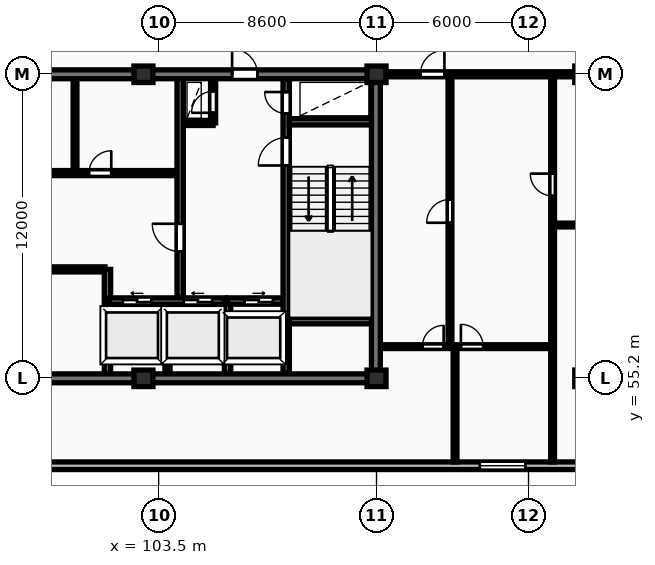
"""IFC4 building model, lengths in metres.
Left out: names, types, materials, properties, quantities, classifications, styles, units other than length and angle.
Written with IfcOpenShell. Run it as: python <this file> out.ifc"""

import sys

from ifc_helpers import new_model, si_unit, direction, frame, frame_2d, origin, origin_2d, place, context, subcontext, project, spatial, rectangle, extrude, element, fill, save


model = new_model("IFC4")
c1 = context("Model", 3, precision=1e-05, world=origin(), true_north=direction((0.0, 1.0)))
c2 = subcontext(c1, "Body", "Model", "MODEL_VIEW")
j1 = project(units=[si_unit("LENGTHUNIT", "METRE"), si_unit("PLANEANGLEUNIT", "RADIAN")], contexts=[c1])
p1 = place(None, origin())
s1 = spatial("IfcSite", under=j1, at=p1, CompositionType="ELEMENT")
p2 = place(p1, origin())
s2 = spatial("IfcBuilding", under=s1, at=p2, CompositionType="ELEMENT")
p3 = place(p2, frame((0.0, 0.0, 235.55)))
s3 = spatial("IfcBuildingStorey", under=s2, at=p3, CompositionType="ELEMENT", Elevation=235.55)
for number, where, z_axis, x_axis in (
    (1, (102.9, 55.2, 0.0), (0.0, 0.0, 1.0), (1.0, 0.0, 0.0)),
    (2, (102.9, 67.2, 0.0), (0.0, 0.0, 1.0), (1.0, 0.0, 0.0)),
    (3, (112.1, 55.2, 0.0), (0.0, 0.0, 1.0), (1.0, 0.0, 0.0)),
    (4, (112.1, 67.2, 0.0), (0.0, 0.0, 1.0), (1.0, 0.0, 0.0)),
    (5, (120.3, 55.2, 0.0), (0.0, 0.0, 1.0), (1.0, 0.0, 0.0)),
    (6, (120.3, 67.2, 0.0), (0.0, 0.0, 1.0), (1.0, 0.0, 0.0)),
):
    element("IfcColumn", number, at=place(p3, frame(where, z_axis=z_axis, x_axis=x_axis)), inside=s3, PredefinedType="COLUMN", context=c2, shape_type="SweptSolid", body=[
        extrude(rectangle(XDim=0.75, YDim=0.65, at=origin_2d()), origin(), (0.0, 0.0, 1.0), 3.45),
    ])
p4 = place(p3, frame((59.8, 51.75, 0.0), z_axis=(0.0, 0.0, 1.0), x_axis=(1.0, 0.0, 0.0)))
e7 = element("IfcWall", 7, at=p4, inside=s3, PredefinedType="STANDARD", context=c2, shape_type="SweptSolid", body=[
    extrude(rectangle(XDim=68.6, YDim=0.3, at=frame_2d((34.3, 0.0))), origin(), (0.0, 0.0, 1.0), 3.17),
])
p5 = place(p4, frame((13.025, 0.0, 0.85)))
e8 = element("IfcOpeningElement", 8, at=p5, cuts=e7, PredefinedType="OPENING", context=c2, shape_type="SweptSolid", body=[
    extrude(rectangle(XDim=1.8, YDim=1.8, at=frame_2d((0.9, 0.9))), frame((0.0, 0.16, 0.0), z_axis=(0.0, -1.0, 0.0), x_axis=(1.0, 0.0, 0.0)), (0.0, 0.0, 1.0), 0.32),
])
p6 = place(p4, frame((56.375, 0.0, 0.85)))
e9 = element("IfcOpeningElement", 9, at=p6, cuts=e7, PredefinedType="OPENING", context=c2, shape_type="SweptSolid", body=[
    extrude(rectangle(XDim=1.8, YDim=1.8, at=frame_2d((0.9, 0.9))), frame((0.0, 0.16, 0.0), z_axis=(0.0, -1.0, 0.0), x_axis=(1.0, 0.0, 0.0)), (0.0, 0.0, 1.0), 0.32),
])
p7 = place(p3, frame((75.95, 55.2, 0.0), z_axis=(0.0, 0.0, 1.0), x_axis=(1.0, 0.0, 0.0)))
e10 = element("IfcWall", 10, at=p7, inside=s3, PredefinedType="SHEAR", context=c2, shape_type="SweptSolid", body=[
    extrude(rectangle(XDim=36.3, YDim=0.35, at=frame_2d((18.15, 0.0))), origin(), (0.0, 0.0, 1.0), 3.45),
])
p8 = place(p3, frame((112.075, 55.375, 0.0), z_axis=(0.0, 0.0, 1.0), x_axis=(0.0, 1.0, 0.0)))
e11 = element("IfcWall", 11, at=p8, inside=s3, PredefinedType="SHEAR", context=c2, shape_type="SweptSolid", body=[
    extrude(rectangle(XDim=11.65, YDim=0.35, at=frame_2d((5.825, 0.0))), origin(), (0.0, 0.0, 1.0), 3.45),
])
p9 = place(p3, frame((75.95, 67.2, 0.0), z_axis=(0.0, 0.0, 1.0), x_axis=(1.0, 0.0, 0.0)))
e12 = element("IfcWall", 12, at=p9, inside=s3, PredefinedType="SHEAR", context=c2, shape_type="SweptSolid", body=[
    extrude(rectangle(XDim=36.3, YDim=0.35, at=frame_2d((18.15, 0.0))), origin(), (0.0, 0.0, 1.0), 3.45),
])
p10 = place(p9, frame((5.25, 0.0, 0.0)))
e13 = element("IfcOpeningElement", 13, at=p10, cuts=e12, PredefinedType="OPENING", context=c2, shape_type="SweptSolid", body=[
    extrude(rectangle(XDim=1.0, YDim=2.15, at=frame_2d((0.5, 1.075))), frame((0.0, 0.185, 0.0), z_axis=(0.0, -1.0, 0.0), x_axis=(1.0, 0.0, 0.0)), (0.0, 0.0, 1.0), 0.37),
])
p11 = place(p9, frame((21.6, 0.0, 0.0)))
e14 = element("IfcOpeningElement", 14, at=p11, cuts=e12, PredefinedType="OPENING", context=c2, shape_type="SweptSolid", body=[
    extrude(rectangle(XDim=1.5, YDim=2.2, at=frame_2d((0.75, 1.1))), frame((0.0, 0.185, 0.0), z_axis=(0.0, -1.0, 0.0), x_axis=(1.0, 0.0, 0.0)), (0.0, 0.0, 1.0), 0.37),
])
p12 = place(p9, frame((30.45, 0.0, 0.0)))
e15 = element("IfcOpeningElement", 15, at=p12, cuts=e12, PredefinedType="OPENING", context=c2, shape_type="SweptSolid", body=[
    extrude(rectangle(XDim=1.0, YDim=2.15, at=frame_2d((0.5, 1.075))), frame((0.0, 0.185, 0.0), z_axis=(0.0, -1.0, 0.0), x_axis=(1.0, 0.0, 0.0)), (0.0, 0.0, 1.0), 0.37),
])
p13 = place(p3, frame((93.02, 59.5, 0.0), z_axis=(0.0, 0.0, 1.0), x_axis=(1.0, 0.0, 0.0)))
e16 = element("IfcWall", 16, at=p13, inside=s3, PredefinedType="PARTITIONING", context=c2, shape_type="SweptSolid", body=[
    extrude(rectangle(XDim=8.36, YDim=0.2, at=frame_2d((4.18, 0.0))), origin(), (0.0, 0.0, 1.0), 3.17),
])
p14 = place(p13, frame((3.4, 0.0, 0.0)))
e17 = element("IfcOpeningElement", 17, at=p14, cuts=e16, PredefinedType="OPENING", context=c2, shape_type="SweptSolid", body=[
    extrude(rectangle(XDim=0.92, YDim=2.08, at=frame_2d((0.46, 1.04))), frame((0.0, 0.11, 0.0), z_axis=(0.0, -1.0, 0.0), x_axis=(1.0, 0.0, 0.0)), (0.0, 0.0, 1.0), 0.22),
])
p15 = place(p3, frame((101.48, 55.4, 0.0), z_axis=(0.0, 0.0, 1.0), x_axis=(0.0, 1.0, 0.0)))
e18 = element("IfcWall", 18, at=p15, inside=s3, PredefinedType="SHEAR", context=c2, shape_type="SweptSolid", body=[
    extrude(rectangle(XDim=4.1, YDim=0.25, at=frame_2d((2.05, 0.0))), origin(), (0.0, 0.0, 1.0), 3.45),
])
p16 = place(p3, frame((103.85, 55.4, 0.0), z_axis=(0.0, 0.0, 1.0), x_axis=(0.0, 1.0, 0.0)))
e19 = element("IfcWall", 19, at=p16, inside=s3, PredefinedType="PARTITIONING", context=c2, shape_type="SweptSolid", body=[
    extrude(rectangle(XDim=2.72, YDim=0.2, at=frame_2d((1.36, 0.0))), origin(), (0.0, 0.0, 1.0), 3.17),
])
p17 = place(p3, frame((101.55, 58.25, 0.0), z_axis=(0.0, 0.0, 1.0), x_axis=(1.0, 0.0, 0.0)))
e20 = element("IfcWall", 20, at=p17, inside=s3, PredefinedType="SHEAR", context=c2, shape_type="SweptSolid", body=[
    extrude(rectangle(XDim=4.6, YDim=0.25, at=frame_2d((2.3, 0.0))), origin(), (0.0, 0.0, 1.0), 3.45),
])
p18 = place(p17, frame((0.54, 0.0, 0.0)))
e21 = element("IfcOpeningElement", 21, at=p18, cuts=e20, PredefinedType="OPENING", context=c2, shape_type="SweptSolid", body=[
    extrude(rectangle(XDim=1.12, YDim=2.12, at=frame_2d((0.56, 1.06))), frame((0.0, 0.135, 0.0), z_axis=(0.0, -1.0, 0.0), x_axis=(1.0, 0.0, 0.0)), (0.0, 0.0, 1.0), 0.27),
])
p19 = place(p17, frame((2.94, 0.0, 0.0)))
e22 = element("IfcOpeningElement", 22, at=p19, cuts=e20, PredefinedType="OPENING", context=c2, shape_type="SweptSolid", body=[
    extrude(rectangle(XDim=1.12, YDim=2.12, at=frame_2d((0.56, 1.06))), frame((0.0, 0.135, 0.0), z_axis=(0.0, -1.0, 0.0), x_axis=(1.0, 0.0, 0.0)), (0.0, 0.0, 1.0), 0.27),
])
p20 = place(p3, frame((106.22, 55.4, 0.0), z_axis=(0.0, 0.0, 1.0), x_axis=(0.0, 1.0, 0.0)))
e23 = element("IfcWall", 23, at=p20, inside=s3, PredefinedType="SHEAR", context=c2, shape_type="SweptSolid", body=[
    extrude(rectangle(XDim=2.85, YDim=0.25, at=frame_2d((1.425, 0.0))), origin(), (0.0, 0.0, 1.0), 3.45),
])
p21 = place(p3, frame((106.22, 58.25, 0.0), z_axis=(0.0, 0.0, 1.0), x_axis=(1.0, 0.0, 0.0)))
e24 = element("IfcWall", 24, at=p21, inside=s3, PredefinedType="SHEAR", context=c2, shape_type="SweptSolid", body=[
    extrude(rectangle(XDim=2.46, YDim=0.25, at=frame_2d((1.23, 0.0))), origin(), (0.0, 0.0, 1.0), 3.45),
])
p22 = place(p21, frame((0.67, 0.0, 0.0)))
e25 = element("IfcOpeningElement", 25, at=p22, cuts=e24, PredefinedType="OPENING", context=c2, shape_type="SweptSolid", body=[
    extrude(rectangle(XDim=1.12, YDim=2.12, at=frame_2d((0.56, 1.06))), frame((0.0, 0.135, 0.0), z_axis=(0.0, -1.0, 0.0), x_axis=(1.0, 0.0, 0.0)), (0.0, 0.0, 1.0), 0.27),
])
p23 = place(p3, frame((100.2, 63.4, 0.0), z_axis=(0.0, 0.0, 1.0), x_axis=(0.0, 1.0, 0.0)))
e26 = element("IfcWall", 26, at=p23, inside=s3, PredefinedType="PARTITIONING", context=c2, shape_type="SweptSolid", body=[
    extrude(rectangle(XDim=3.6, YDim=0.15, at=frame_2d((1.8, 0.0))), origin(), (0.0, 0.0, 1.0), 3.17),
])
p24 = place(p3, frame((84.42, 63.3, 0.0), z_axis=(0.0, 0.0, 1.0), x_axis=(1.0, 0.0, 0.0)))
e27 = element("IfcWall", 27, at=p24, inside=s3, PredefinedType="PARTITIONING", context=c2, shape_type="SweptSolid", body=[
    extrude(rectangle(XDim=19.83, YDim=0.2, at=frame_2d((9.915, 0.0))), origin(), (0.0, 0.0, 1.0), 3.17),
])
p25 = place(p24, frame((1.15, 0.0, 0.0)))
e28 = element("IfcOpeningElement", 28, at=p25, cuts=e27, PredefinedType="OPENING", context=c2, shape_type="SweptSolid", body=[
    extrude(rectangle(XDim=0.85, YDim=2.05, at=frame_2d((0.425, 1.025))), frame((0.0, 0.11, 0.0), z_axis=(0.0, -1.0, 0.0), x_axis=(1.0, 0.0, 0.0)), (0.0, 0.0, 1.0), 0.22),
])
p26 = place(p24, frame((3.25, 0.0, 0.0)))
e29 = element("IfcOpeningElement", 29, at=p26, cuts=e27, PredefinedType="OPENING", context=c2, shape_type="SweptSolid", body=[
    extrude(rectangle(XDim=0.85, YDim=2.05, at=frame_2d((0.425, 1.025))), frame((0.0, 0.11, 0.0), z_axis=(0.0, -1.0, 0.0), x_axis=(1.0, 0.0, 0.0)), (0.0, 0.0, 1.0), 0.22),
])
p27 = place(p24, frame((13.08, 0.0, 0.0)))
e30 = element("IfcOpeningElement", 30, at=p27, cuts=e27, PredefinedType="OPENING", context=c2, shape_type="SweptSolid", body=[
    extrude(rectangle(XDim=1.5, YDim=2.2, at=frame_2d((0.75, 1.1))), frame((0.0, 0.11, 0.0), z_axis=(0.0, -1.0, 0.0), x_axis=(1.0, 0.0, 0.0)), (0.0, 0.0, 1.0), 0.22),
])
p28 = place(p24, frame((6.68, 0.0, 0.0)))
e31 = element("IfcOpeningElement", 31, at=p28, cuts=e27, PredefinedType="OPENING", context=c2, shape_type="SweptSolid", body=[
    extrude(rectangle(XDim=0.92, YDim=2.08, at=frame_2d((0.46, 1.04))), frame((0.0, 0.11, 0.0), z_axis=(0.0, -1.0, 0.0), x_axis=(1.0, 0.0, 0.0)), (0.0, 0.0, 1.0), 0.22),
])
p29 = place(p24, frame((16.33, 0.0, 0.0)))
e32 = element("IfcOpeningElement", 32, at=p29, cuts=e27, PredefinedType="OPENING", context=c2, shape_type="SweptSolid", body=[
    extrude(rectangle(XDim=0.88, YDim=2.06, at=frame_2d((0.44, 1.03))), frame((0.0, 0.11, 0.0), z_axis=(0.0, -1.0, 0.0), x_axis=(1.0, 0.0, 0.0)), (0.0, 0.0, 1.0), 0.22),
])
p30 = place(p3, frame((104.45, 65.28, 0.0), z_axis=(0.0, 0.0, 1.0), x_axis=(1.0, 0.0, 0.0)))
e33 = element("IfcWall", 33, at=p30, inside=s3, PredefinedType="PARTITIONING", context=c2, shape_type="SweptSolid", body=[
    extrude(rectangle(XDim=1.2, YDim=0.2, at=frame_2d((0.6, 0.0))), origin(), (0.0, 0.0, 1.0), 3.17),
])
p31 = place(p3, frame((105.65, 65.28, 0.0), z_axis=(0.0, 0.0, 1.0), x_axis=(0.0, 1.0, 0.0)))
e34 = element("IfcWall", 34, at=p31, inside=s3, PredefinedType="PARTITIONING", context=c2, shape_type="SweptSolid", body=[
    extrude(rectangle(XDim=1.72, YDim=0.2, at=frame_2d((0.86, 0.0))), origin(), (0.0, 0.0, 1.0), 3.17),
])
p32 = place(p31, frame((0.4, 0.0, 0.0)))
e35 = element("IfcOpeningElement", 35, at=p32, cuts=e34, PredefinedType="OPENING", context=c2, shape_type="SweptSolid", body=[
    extrude(rectangle(XDim=0.85, YDim=2.05, at=frame_2d((0.425, 1.025))), frame((0.0, 0.11, 0.0), z_axis=(0.0, -1.0, 0.0), x_axis=(1.0, 0.0, 0.0)), (0.0, 0.0, 1.0), 0.22),
])
p33 = place(p3, frame((104.35, 58.4, 0.0), z_axis=(0.0, 0.0, 1.0), x_axis=(0.0, 1.0, 0.0)))
e36 = element("IfcWall", 36, at=p33, inside=s3, PredefinedType="SHEAR", context=c2, shape_type="SweptSolid", body=[
    extrude(rectangle(XDim=8.6, YDim=0.25, at=frame_2d((4.3, 0.0))), origin(), (0.0, 0.0, 1.0), 3.45),
])
p34 = place(p33, frame((1.8, 0.0, 0.0)))
e37 = element("IfcOpeningElement", 37, at=p34, cuts=e36, PredefinedType="OPENING", context=c2, shape_type="SweptSolid", body=[
    extrude(rectangle(XDim=1.1, YDim=2.1, at=frame_2d((0.55, 1.05))), frame((0.0, 0.135, 0.0), z_axis=(0.0, -1.0, 0.0), x_axis=(1.0, 0.0, 0.0)), (0.0, 0.0, 1.0), 0.27),
])
p35 = place(p3, frame((108.535, 55.4, 0.0), z_axis=(0.0, 0.0, 1.0), x_axis=(0.0, 1.0, 0.0)))
e38 = element("IfcWall", 38, at=p35, inside=s3, PredefinedType="SHEAR", context=c2, shape_type="SweptSolid", body=[
    extrude(rectangle(XDim=11.6, YDim=0.25, at=frame_2d((5.8, 0.0))), origin(), (0.0, 0.0, 1.0), 3.45),
])
p36 = place(p35, frame((8.2, 0.0, 0.0)))
e39 = element("IfcOpeningElement", 39, at=p36, cuts=e38, PredefinedType="OPENING", context=c2, shape_type="SweptSolid", body=[
    extrude(rectangle(XDim=1.1, YDim=2.1, at=frame_2d((0.55, 1.05))), frame((0.0, 0.135, 0.0), z_axis=(0.0, -1.0, 0.0), x_axis=(1.0, 0.0, 0.0)), (0.0, 0.0, 1.0), 0.27),
])
p37 = place(p35, frame((10.25, 0.0, 0.0)))
e40 = element("IfcOpeningElement", 40, at=p37, cuts=e38, PredefinedType="OPENING", context=c2, shape_type="SweptSolid", body=[
    extrude(rectangle(XDim=0.85, YDim=2.05, at=frame_2d((0.425, 1.025))), frame((0.0, 0.135, 0.0), z_axis=(0.0, -1.0, 0.0), x_axis=(1.0, 0.0, 0.0)), (0.0, 0.0, 1.0), 0.27),
])
for number, where, z_axis, x_axis in (
    (41, (108.66, 57.475, 0.0), (0.0, 0.0, 1.0), (1.0, 0.0, 0.0)),
    (42, (108.66, 65.325, 0.0), (0.0, 0.0, 1.0), (1.0, 0.0, 0.0)),
):
    element("IfcWall", number, at=place(p3, frame(where, z_axis=z_axis, x_axis=x_axis)), inside=s3, PredefinedType="SHEAR", context=c2, shape_type="SweptSolid", body=[
        extrude(rectangle(XDim=3.24, YDim=0.25, at=frame_2d((1.62, 0.0))), origin(), (0.0, 0.0, 1.0), 3.45),
    ])
p38 = place(p3, frame((119.05, 61.25, 0.0), z_axis=(0.0, 0.0, 1.0), x_axis=(1.0, 0.0, 0.0)))
e43 = element("IfcWall", 43, at=p38, inside=s3, PredefinedType="PARTITIONING", context=c2, shape_type="SweptSolid", body=[
    extrude(rectangle(XDim=9.35, YDim=0.15, at=frame_2d((4.675, 0.0))), origin(), (0.0, 0.0, 1.0), 3.17),
])
p39 = place(p38, frame((4.255, 0.0, 0.0)))
e44 = element("IfcOpeningElement", 44, at=p39, cuts=e43, PredefinedType="OPENING", context=c2, shape_type="SweptSolid", body=[
    extrude(rectangle(XDim=0.84, YDim=2.04, at=frame_2d((0.42, 1.02))), frame((0.0, 0.085, 0.0), z_axis=(0.0, -1.0, 0.0), x_axis=(1.0, 0.0, 0.0)), (0.0, 0.0, 1.0), 0.17),
])
p40 = place(p3, frame((119.05, 51.9, 0.0), z_axis=(0.0, 0.0, 1.0), x_axis=(0.0, 1.0, 0.0)))
e45 = element("IfcWall", 45, at=p40, inside=s3, PredefinedType="PARTITIONING", context=c2, shape_type="SweptSolid", body=[
    extrude(rectangle(XDim=15.25, YDim=0.15, at=frame_2d((7.625, 0.0))), origin(), (0.0, 0.0, 1.0), 3.17),
])
p41 = place(p40, frame((10.5, 0.0, 0.0)))
e46 = element("IfcOpeningElement", 46, at=p41, cuts=e45, PredefinedType="OPENING", context=c2, shape_type="SweptSolid", body=[
    extrude(rectangle(XDim=0.88, YDim=2.06, at=frame_2d((0.44, 1.03))), frame((0.0, 0.085, 0.0), z_axis=(0.0, -1.0, 0.0), x_axis=(1.0, 0.0, 0.0)), (0.0, 0.0, 1.0), 0.17),
])
p42 = place(p3, frame((115.0, 56.45, 0.0), z_axis=(0.0, 0.0, 1.0), x_axis=(0.0, 1.0, 0.0)))
e47 = element("IfcWall", 47, at=p42, inside=s3, PredefinedType="PARTITIONING", context=c2, shape_type="SweptSolid", body=[
    extrude(rectangle(XDim=10.7, YDim=0.15, at=frame_2d((5.35, 0.0))), origin(), (0.0, 0.0, 1.0), 3.17),
])
p43 = place(p42, frame((4.89, 0.0, 0.0)))
e48 = element("IfcOpeningElement", 48, at=p43, cuts=e47, PredefinedType="OPENING", context=c2, shape_type="SweptSolid", body=[
    extrude(rectangle(XDim=0.92, YDim=2.08, at=frame_2d((0.46, 1.04))), frame((0.0, 0.085, 0.0), z_axis=(0.0, -1.0, 0.0), x_axis=(1.0, 0.0, 0.0)), (0.0, 0.0, 1.0), 0.17),
])
p44 = place(p3, frame((115.2, 51.9, 0.0), z_axis=(0.0, 0.0, 1.0), x_axis=(0.0, 1.0, 0.0)))
e49 = element("IfcWall", 49, at=p44, inside=s3, PredefinedType="PARTITIONING", context=c2, shape_type="SweptSolid", body=[
    extrude(rectangle(XDim=4.55, YDim=0.15, at=frame_2d((2.275, 0.0))), origin(), (0.0, 0.0, 1.0), 3.17),
])
p45 = place(p3, frame((112.27, 56.45, 0.0), z_axis=(0.0, 0.0, 1.0), x_axis=(1.0, 0.0, 0.0)))
e50 = element("IfcWall", 50, at=p45, inside=s3, PredefinedType="PARTITIONING", context=c2, shape_type="SweptSolid", body=[
    extrude(rectangle(XDim=6.76, YDim=0.15, at=frame_2d((3.38, 0.0))), origin(), (0.0, 0.0, 1.0), 3.17),
])
p46 = place(p45, frame((1.64, 0.0, 0.0)))
e51 = element("IfcOpeningElement", 51, at=p46, cuts=e50, PredefinedType="OPENING", context=c2, shape_type="SweptSolid", body=[
    extrude(rectangle(XDim=0.84, YDim=2.04, at=frame_2d((0.42, 1.02))), frame((0.0, 0.085, 0.0), z_axis=(0.0, -1.0, 0.0), x_axis=(1.0, 0.0, 0.0)), (0.0, 0.0, 1.0), 0.17),
])
p47 = place(p45, frame((3.16, 0.0, 0.0)))
e52 = element("IfcOpeningElement", 52, at=p47, cuts=e50, PredefinedType="OPENING", context=c2, shape_type="SweptSolid", body=[
    extrude(rectangle(XDim=0.88, YDim=2.06, at=frame_2d((0.44, 1.03))), frame((0.0, 0.085, 0.0), z_axis=(0.0, -1.0, 0.0), x_axis=(1.0, 0.0, 0.0)), (0.0, 0.0, 1.0), 0.17),
])
p48 = place(p3, frame((112.25, 67.2, 0.0), z_axis=(0.0, 0.0, 1.0), x_axis=(1.0, 0.0, 0.0)))
e53 = element("IfcWall", 53, at=p48, inside=s3, PredefinedType="PARTITIONING", context=c2, shape_type="SweptSolid", body=[
    extrude(rectangle(XDim=16.15, YDim=0.2, at=frame_2d((8.075, 0.0))), origin(), (0.0, 0.0, 1.0), 2.633),
])
p49 = place(p48, frame((1.58, 0.0, 0.0)))
e54 = element("IfcOpeningElement", 54, at=p49, cuts=e53, PredefinedType="OPENING", context=c2, shape_type="SweptSolid", body=[
    extrude(rectangle(XDim=0.95, YDim=2.15, at=frame_2d((0.475, 1.075))), frame((0.0, 0.11, 0.0), z_axis=(0.0, -1.0, 0.0), x_axis=(1.0, 0.0, 0.0)), (0.0, 0.0, 1.0), 0.22),
])
p50 = place(p6, origin())
e55 = element("IfcWindow", 55, at=p50, inside=s3, PartitioningType="SINGLE_PANEL", PredefinedType="WINDOW", context=c2, shape_type="SweptSolid", body=[
    extrude(rectangle(XDim=1.8, YDim=1.8, at=frame_2d((0.9, 0.9))), frame((0.0, 0.03, 0.0), z_axis=(0.0, -1.0, 0.0), x_axis=(1.0, 0.0, 0.0)), (0.0, 0.0, 1.0), 0.06),
])
fill(e9, e55)
p51 = place(p12, origin())
e56 = element("IfcDoor", 56, at=p51, inside=s3, OperationType="SINGLE_SWING_LEFT", PredefinedType="DOOR", context=c2, shape_type="SweptSolid", body=[
    extrude(rectangle(XDim=1.0, YDim=2.15, at=frame_2d((0.5, 1.075))), frame((0.0, 0.025, 0.0), z_axis=(0.0, -1.0, 0.0), x_axis=(1.0, 0.0, 0.0)), (0.0, 0.0, 1.0), 0.05),
])
fill(e15, e56)
p52 = place(p18, origin())
e57 = element("IfcDoor", 57, at=p52, inside=s3, OperationType="SLIDING_TO_LEFT", PredefinedType="DOOR", context=c2, shape_type="SweptSolid", body=[
    extrude(rectangle(XDim=1.12, YDim=2.12, at=frame_2d((0.56, 1.06))), frame((0.0, 0.025, 0.0), z_axis=(0.0, -1.0, 0.0), x_axis=(1.0, 0.0, 0.0)), (0.0, 0.0, 1.0), 0.05),
])
fill(e21, e57)
p53 = place(p19, origin())
e58 = element("IfcDoor", 58, at=p53, inside=s3, OperationType="SLIDING_TO_LEFT", PredefinedType="DOOR", context=c2, shape_type="SweptSolid", body=[
    extrude(rectangle(XDim=1.12, YDim=2.12, at=frame_2d((0.56, 1.06))), frame((0.0, 0.025, 0.0), z_axis=(0.0, -1.0, 0.0), x_axis=(1.0, 0.0, 0.0)), (0.0, 0.0, 1.0), 0.05),
])
fill(e22, e58)
p54 = place(p22, origin())
e59 = element("IfcDoor", 59, at=p54, inside=s3, OperationType="SLIDING_TO_RIGHT", PredefinedType="DOOR", context=c2, shape_type="SweptSolid", body=[
    extrude(rectangle(XDim=1.12, YDim=2.12, at=frame_2d((0.56, 1.06))), frame((0.0, 0.025, 0.0), z_axis=(0.0, -1.0, 0.0), x_axis=(1.0, 0.0, 0.0)), (0.0, 0.0, 1.0), 0.05),
])
fill(e25, e59)
p55 = place(p29, origin())
e60 = element("IfcDoor", 60, at=p55, inside=s3, OperationType="SINGLE_SWING_RIGHT", PredefinedType="DOOR", context=c2, shape_type="SweptSolid", body=[
    extrude(rectangle(XDim=0.88, YDim=2.06, at=frame_2d((0.44, 1.03))), frame((0.0, 0.025, 0.0), z_axis=(0.0, -1.0, 0.0), x_axis=(1.0, 0.0, 0.0)), (0.0, 0.0, 1.0), 0.05),
])
fill(e32, e60)
p56 = place(p32, origin())
e61 = element("IfcDoor", 61, at=p56, inside=s3, OperationType="SINGLE_SWING_LEFT", PredefinedType="DOOR", context=c2, shape_type="SweptSolid", body=[
    extrude(rectangle(XDim=0.85, YDim=2.05, at=frame_2d((0.425, 1.025))), frame((0.0, 0.025, 0.0), z_axis=(0.0, -1.0, 0.0), x_axis=(1.0, 0.0, 0.0)), (0.0, 0.0, 1.0), 0.05),
])
fill(e35, e61)
p57 = place(p34, origin())
e62 = element("IfcDoor", 62, at=p57, inside=s3, OperationType="SINGLE_SWING_RIGHT", PredefinedType="DOOR", context=c2, shape_type="SweptSolid", body=[
    extrude(rectangle(XDim=1.1, YDim=2.1, at=frame_2d((0.55, 1.05))), frame((0.0, 0.025, 0.0), z_axis=(0.0, -1.0, 0.0), x_axis=(1.0, 0.0, 0.0)), (0.0, 0.0, 1.0), 0.05),
])
fill(e37, e62)
p58 = place(p36, origin())
e63 = element("IfcDoor", 63, at=p58, inside=s3, OperationType="SINGLE_SWING_LEFT", PredefinedType="DOOR", context=c2, shape_type="SweptSolid", body=[
    extrude(rectangle(XDim=1.1, YDim=2.1, at=frame_2d((0.55, 1.05))), frame((0.0, 0.025, 0.0), z_axis=(0.0, -1.0, 0.0), x_axis=(1.0, 0.0, 0.0)), (0.0, 0.0, 1.0), 0.05),
])
fill(e39, e63)
p59 = place(p37, origin())
e64 = element("IfcDoor", 64, at=p59, inside=s3, OperationType="SINGLE_SWING_RIGHT", PredefinedType="DOOR", context=c2, shape_type="SweptSolid", body=[
    extrude(rectangle(XDim=0.85, YDim=2.05, at=frame_2d((0.425, 1.025))), frame((0.0, 0.025, 0.0), z_axis=(0.0, -1.0, 0.0), x_axis=(1.0, 0.0, 0.0)), (0.0, 0.0, 1.0), 0.05),
])
fill(e40, e64)
p60 = place(p41, origin())
e65 = element("IfcDoor", 65, at=p60, inside=s3, OperationType="SINGLE_SWING_RIGHT", PredefinedType="DOOR", context=c2, shape_type="SweptSolid", body=[
    extrude(rectangle(XDim=0.88, YDim=2.06, at=frame_2d((0.44, 1.03))), frame((0.0, 0.025, 0.0), z_axis=(0.0, -1.0, 0.0), x_axis=(1.0, 0.0, 0.0)), (0.0, 0.0, 1.0), 0.05),
])
fill(e46, e65)
p61 = place(p43, origin())
e66 = element("IfcDoor", 66, at=p61, inside=s3, OperationType="SINGLE_SWING_LEFT", PredefinedType="DOOR", context=c2, shape_type="SweptSolid", body=[
    extrude(rectangle(XDim=0.92, YDim=2.08, at=frame_2d((0.46, 1.04))), frame((0.0, 0.025, 0.0), z_axis=(0.0, -1.0, 0.0), x_axis=(1.0, 0.0, 0.0)), (0.0, 0.0, 1.0), 0.05),
])
fill(e48, e66)
p62 = place(p46, origin())
e67 = element("IfcDoor", 67, at=p62, inside=s3, OperationType="SINGLE_SWING_RIGHT", PredefinedType="DOOR", context=c2, shape_type="SweptSolid", body=[
    extrude(rectangle(XDim=0.84, YDim=2.04, at=frame_2d((0.42, 1.02))), frame((0.0, 0.025, 0.0), z_axis=(0.0, -1.0, 0.0), x_axis=(1.0, 0.0, 0.0)), (0.0, 0.0, 1.0), 0.05),
])
fill(e51, e67)
p63 = place(p47, origin())
e68 = element("IfcDoor", 68, at=p63, inside=s3, OperationType="SINGLE_SWING_LEFT", PredefinedType="DOOR", context=c2, shape_type="SweptSolid", body=[
    extrude(rectangle(XDim=0.88, YDim=2.06, at=frame_2d((0.44, 1.03))), frame((0.0, 0.025, 0.0), z_axis=(0.0, -1.0, 0.0), x_axis=(1.0, 0.0, 0.0)), (0.0, 0.0, 1.0), 0.05),
])
fill(e52, e68)
p64 = place(p49, origin())
e69 = element("IfcDoor", 69, at=p64, inside=s3, OperationType="SINGLE_SWING_RIGHT", PredefinedType="DOOR", context=c2, shape_type="SweptSolid", body=[
    extrude(rectangle(XDim=0.95, YDim=2.15, at=frame_2d((0.475, 1.075))), frame((0.0, 0.025, 0.0), z_axis=(0.0, -1.0, 0.0), x_axis=(1.0, 0.0, 0.0)), (0.0, 0.0, 1.0), 0.05),
])
fill(e54, e69)
save(model, sys.argv[1])
